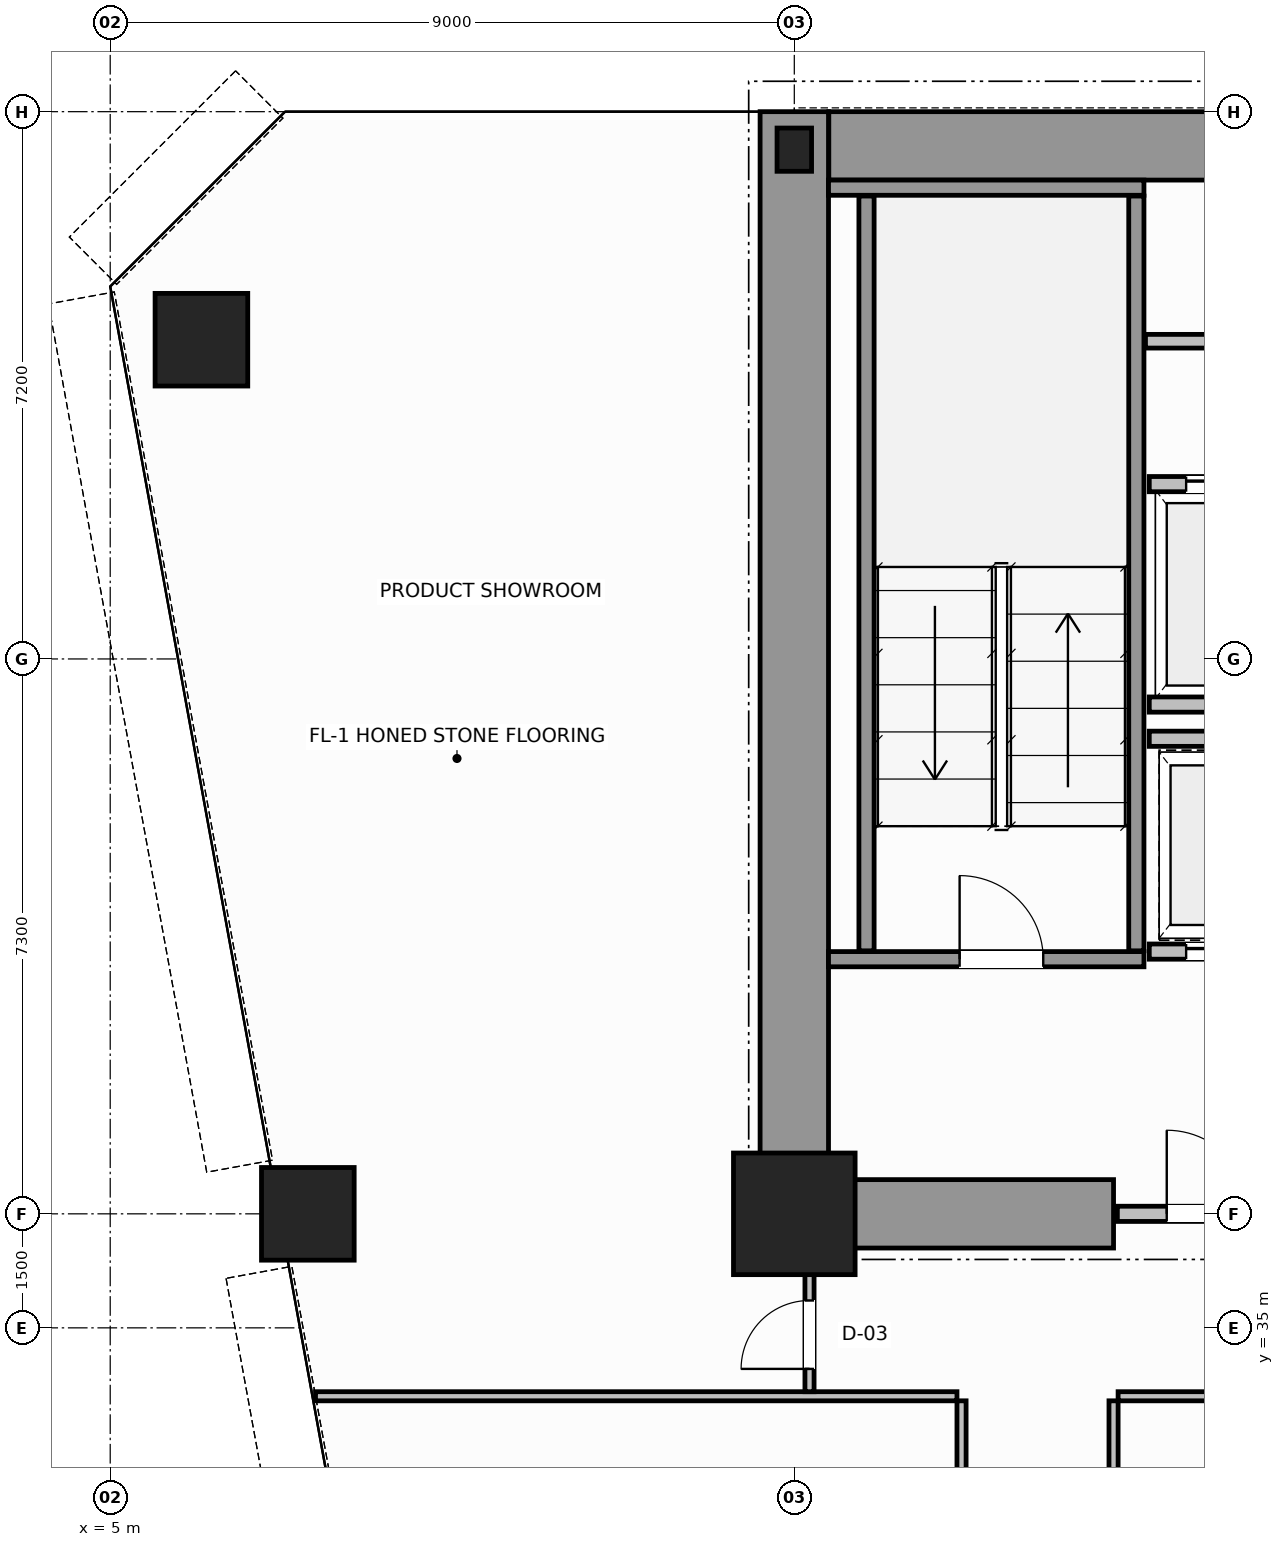
"""IFC4 building model, lengths in metres.
Left out: names, types, materials, properties, quantities, classifications, styles, units other than length and angle.
Written with IfcOpenShell. Run it as: python <this file> out.ifc"""

import sys

from ifc_helpers import new_model, si_unit, direction, frame, frame_2d, origin, origin_2d, place, context, subcontext, project, spatial, rectangle, hollow_circle, i_section, extrude, source, transform, mapped, element, fill, save


model = new_model("IFC4")
c1 = context("Model", 3, precision=1e-05, world=origin(), true_north=direction((0.0, 1.0)))
c2 = subcontext(c1, "Body", "Model", "MODEL_VIEW")
j1 = project(units=[si_unit("LENGTHUNIT", "METRE"), si_unit("PLANEANGLEUNIT", "RADIAN")], contexts=[c1])
p1 = place(None, origin())
s1 = spatial("IfcSite", under=j1, at=p1, CompositionType="ELEMENT")
p2 = place(p1, origin())
s2 = spatial("IfcBuilding", under=s1, at=p2, CompositionType="ELEMENT")
p3 = place(p2, frame((0.0, 0.0, 56.8)))
s3 = spatial("IfcBuildingStorey", under=s2, at=p3, CompositionType="ELEMENT", Elevation=56.8)
m1 = source(origin(), c2, "Body", "SweptSolid", [
    extrude(rectangle(XDim=1.6, YDim=1.6, at=origin_2d()), origin(), (0.0, 0.0, 1.0), 3.8),
])
p4 = place(p3, frame((14.0, 36.5, 0.0), z_axis=(0.0, 0.0, 1.0), x_axis=(1.0, 0.0, 0.0)))
e1 = element("IfcColumn", 1, at=p4, inside=s3, PredefinedType="COLUMN", context=c2, shape_type="MappedRepresentation", body=[
    mapped(m1, transform((0.0, 0.0, 0.0), scale=1.0)),
])
m2 = source(origin(), c2, "Body", "SweptSolid", [
    extrude(i_section(OverallWidth=0.454, OverallDepth=0.569, WebThickness=0.078, FlangeThickness=0.08, FilletRadius=0.015, at=origin_2d()), origin(), (0.0, 0.0, 1.0), 3.8),
])
p5 = place(p3, frame((14.0, 50.5, 0.0), z_axis=(0.0, 0.0, 1.0), x_axis=(1.0, 0.0, 0.0)))
e2 = element("IfcColumn", 2, at=p5, inside=s3, PredefinedType="COLUMN", context=c2, shape_type="MappedRepresentation", body=[
    mapped(m2, transform((0.0, 0.0, 0.0), scale=1.0)),
])
m3 = source(origin(), c2, "Body", "SweptSolid", [
    extrude(hollow_circle(Radius=0.61, WallThickness=0.05, at=origin_2d()), origin(), (0.0, 0.0, 1.0), 3.8),
])
for number, where, z_axis, x_axis in (
    (3, (6.2, 48.0, 0.0), (0.0, 0.0, 1.0), (1.0, 0.0, 0.0)),
    (4, (7.6, 36.5, 0.0), (0.0, 0.0, 1.0), (1.0, 0.0, 0.0)),
):
    element("IfcColumn", number, at=place(p3, frame(where, z_axis=z_axis, x_axis=x_axis)), inside=s3, PredefinedType="COLUMN", context=c2, shape_type="MappedRepresentation", body=[
        mapped(m3, transform((0.0, 0.0, 0.0), scale=1.0)),
    ])
p6 = place(p3, frame((14.454, 50.55, 0.0), z_axis=(0.0, 0.0, 1.0), x_axis=(1.0, 0.0, 0.0)))
e5 = element("IfcWall", 5, at=p6, inside=s3, PredefinedType="SHEAR", context=c2, shape_type="SweptSolid", body=[
    extrude(rectangle(XDim=19.544, YDim=0.9, at=frame_2d((9.772, 0.0))), origin(), (0.0, 0.0, 1.0), 3.8),
])
p7 = place(p3, frame((14.0, 36.5, 0.0), z_axis=(0.0, 0.0, 1.0), x_axis=(0.0, 1.0, 0.0)))
e6 = element("IfcWall", 6, at=p7, inside=s3, PredefinedType="SHEAR", context=c2, shape_type="SweptSolid", body=[
    extrude(rectangle(XDim=14.5, YDim=0.9, at=frame_2d((7.25, 0.0))), origin(), (0.0, 0.0, 1.0), 3.8),
])
p8 = place(p3, frame((14.47, 36.5, 0.0), z_axis=(0.0, 0.0, 1.0), x_axis=(1.0, 0.0, 0.0)))
e7 = element("IfcWall", 7, at=p8, inside=s3, PredefinedType="SHEAR", context=c2, shape_type="SweptSolid", body=[
    extrude(rectangle(XDim=3.73, YDim=0.9, at=frame_2d((1.865, 0.0))), origin(), (0.0, 0.0, 1.0), 2.38),
])
p9 = place(p3, frame((14.45, 39.85, 0.0), z_axis=(0.0, 0.0, 1.0), x_axis=(1.0, 0.0, 0.0)))
e8 = element("IfcWall", 8, at=p9, inside=s3, PredefinedType="SOLIDWALL", context=c2, shape_type="SweptSolid", body=[
    extrude(rectangle(XDim=4.15, YDim=0.2, at=frame_2d((2.075, 0.0))), origin(), (0.0, 0.0, 1.0), 3.8),
])
p10 = place(p9, frame((1.725, 0.0, 0.0)))
e9 = element("IfcOpeningElement", 9, at=p10, cuts=e8, PredefinedType="OPENING", context=c2, shape_type="SweptSolid", body=[
    extrude(rectangle(XDim=1.1, YDim=2.15, at=frame_2d((0.55, 1.075))), frame((0.0, 0.11, 0.0), z_axis=(0.0, -1.0, 0.0), x_axis=(1.0, 0.0, 0.0)), (0.0, 0.0, 1.0), 0.22),
])
p11 = place(p3, frame((14.45, 50.0, 0.0), z_axis=(0.0, 0.0, 1.0), x_axis=(1.0, 0.0, 0.0)))
e10 = element("IfcWall", 10, at=p11, inside=s3, PredefinedType="SOLIDWALL", context=c2, shape_type="SweptSolid", body=[
    extrude(rectangle(XDim=4.15, YDim=0.2, at=frame_2d((2.075, 0.0))), origin(), (0.0, 0.0, 1.0), 3.8),
])
for number, where, z_axis, x_axis in (
    (11, (14.95, 39.96, 0.0), (0.0, 0.0, 1.0), (0.0, 1.0, 0.0)),
    (12, (18.5, 39.96, 0.0), (0.0, 0.0, 1.0), (0.0, 1.0, 0.0)),
):
    element("IfcWall", number, at=place(p3, frame(where, z_axis=z_axis, x_axis=x_axis)), inside=s3, PredefinedType="SOLIDWALL", context=c2, shape_type="SweptSolid", body=[
        extrude(rectangle(XDim=9.93, YDim=0.2, at=frame_2d((4.965, 0.0))), origin(), (0.0, 0.0, 1.0), 3.8),
    ])
p12 = place(p3, frame((18.25, 36.5, 0.0), z_axis=(0.0, 0.0, 1.0), x_axis=(1.0, 0.0, 0.0)))
e13 = element("IfcWall", 13, at=p12, inside=s3, PredefinedType="SOLIDWALL", context=c2, shape_type="SweptSolid", body=[
    extrude(rectangle(XDim=2.47, YDim=0.2, at=frame_2d((1.235, 0.0))), origin(), (0.0, 0.0, 1.0), 2.37),
])
p13 = place(p12, frame((0.65, 0.0, 0.0)))
e14 = element("IfcOpeningElement", 14, at=p13, cuts=e13, PredefinedType="OPENING", context=c2, shape_type="SweptSolid", body=[
    extrude(rectangle(XDim=1.1, YDim=2.15, at=frame_2d((0.55, 1.075))), frame((0.0, 0.11, 0.0), z_axis=(0.0, -1.0, 0.0), x_axis=(1.0, 0.0, 0.0)), (0.0, 0.0, 1.0), 0.22),
])
p14 = place(p3, frame((18.67, 46.1, 0.0), z_axis=(0.0, 0.0, 1.0), x_axis=(1.0, 0.0, 0.0)))
e15 = element("IfcWall", 15, at=p14, inside=s3, PredefinedType="SOLIDWALL", context=c2, shape_type="SweptSolid", body=[
    extrude(rectangle(XDim=2.07, YDim=0.2, at=frame_2d((1.035, 0.0))), origin(), (0.0, 0.0, 1.0), 3.58),
])
p15 = place(p14, frame((0.485, 0.0, 0.0)))
e16 = element("IfcOpeningElement", 16, at=p15, cuts=e15, PredefinedType="OPENING", context=c2, shape_type="SweptSolid", body=[
    extrude(rectangle(XDim=1.1, YDim=2.15, at=frame_2d((0.55, 1.075))), frame((0.0, 0.11, 0.0), z_axis=(0.0, -1.0, 0.0), x_axis=(1.0, 0.0, 0.0)), (0.0, 0.0, 1.0), 0.22),
])
p16 = place(p3, frame((18.67, 43.2, 0.0), z_axis=(0.0, 0.0, 1.0), x_axis=(1.0, 0.0, 0.0)))
e17 = element("IfcWall", 17, at=p16, inside=s3, PredefinedType="SOLIDWALL", context=c2, shape_type="SweptSolid", body=[
    extrude(rectangle(XDim=2.07, YDim=0.2, at=frame_2d((1.035, 0.0))), origin(), (0.0, 0.0, 1.0), 3.58),
])
p17 = place(p3, frame((18.67, 39.95, 0.0), z_axis=(0.0, 0.0, 1.0), x_axis=(1.0, 0.0, 0.0)))
e18 = element("IfcWall", 18, at=p17, inside=s3, PredefinedType="SOLIDWALL", context=c2, shape_type="SweptSolid", body=[
    extrude(rectangle(XDim=2.07, YDim=0.2, at=frame_2d((1.035, 0.0))), origin(), (0.0, 0.0, 1.0), 3.58),
])
p18 = place(p17, frame((0.485, 0.0, 0.0)))
e19 = element("IfcOpeningElement", 19, at=p18, cuts=e18, PredefinedType="OPENING", context=c2, shape_type="SweptSolid", body=[
    extrude(rectangle(XDim=1.1, YDim=2.15, at=frame_2d((0.55, 1.075))), frame((0.0, 0.11, 0.0), z_axis=(0.0, -1.0, 0.0), x_axis=(1.0, 0.0, 0.0)), (0.0, 0.0, 1.0), 0.22),
])
p19 = place(p3, frame((18.67, 42.75, 0.0), z_axis=(0.0, 0.0, 1.0), x_axis=(1.0, 0.0, 0.0)))
e20 = element("IfcWall", 20, at=p19, inside=s3, PredefinedType="SOLIDWALL", context=c2, shape_type="SweptSolid", body=[
    extrude(rectangle(XDim=2.07, YDim=0.2, at=frame_2d((1.035, 0.0))), origin(), (0.0, 0.0, 1.0), 3.58),
])
p20 = place(p3, frame((18.62, 47.98, 0.0), z_axis=(0.0, 0.0, 1.0), x_axis=(1.0, 0.0, 0.0)))
e21 = element("IfcWall", 21, at=p20, inside=s3, PredefinedType="PLUMBINGWALL", context=c2, shape_type="SweptSolid", body=[
    extrude(rectangle(XDim=20.06, YDim=0.18, at=frame_2d((10.03, 0.0))), origin(), (0.0, 0.0, 1.0), 3.58),
])
p21 = place(p20, frame((3.5, 0.0, 0.0)))
e22 = element("IfcOpeningElement", 22, at=p21, cuts=e21, PredefinedType="OPENING", context=c2, shape_type="SweptSolid", body=[
    extrude(rectangle(XDim=0.9, YDim=2.15, at=frame_2d((0.45, 1.075))), frame((0.0, 0.1, 0.0), z_axis=(0.0, -1.0, 0.0), x_axis=(1.0, 0.0, 0.0)), (0.0, 0.0, 1.0), 0.2),
])
p22 = place(p20, frame((10.8, 0.0, 0.0)))
e23 = element("IfcOpeningElement", 23, at=p22, cuts=e21, PredefinedType="OPENING", context=c2, shape_type="SweptSolid", body=[
    extrude(rectangle(XDim=0.9, YDim=2.15, at=frame_2d((0.45, 1.075))), frame((0.0, 0.1, 0.0), z_axis=(0.0, -1.0, 0.0), x_axis=(1.0, 0.0, 0.0)), (0.0, 0.0, 1.0), 0.2),
])
p23 = place(p20, frame((16.8, 0.0, 0.0)))
e24 = element("IfcOpeningElement", 24, at=p23, cuts=e21, PredefinedType="OPENING", context=c2, shape_type="SweptSolid", body=[
    extrude(rectangle(XDim=0.9, YDim=2.15, at=frame_2d((0.45, 1.075))), frame((0.0, 0.1, 0.0), z_axis=(0.0, -1.0, 0.0), x_axis=(1.0, 0.0, 0.0)), (0.0, 0.0, 1.0), 0.2),
])
p24 = place(p3, frame((18.26, 34.1, 0.0), z_axis=(0.0, 0.0, 1.0), x_axis=(1.0, 0.0, 0.0)))
e25 = element("IfcWall", 25, at=p24, inside=s3, PredefinedType="PARTITIONING", context=c2, shape_type="SweptSolid", body=[
    extrude(rectangle(XDim=31.48, YDim=0.12, at=frame_2d((15.74, 0.0))), origin(), (0.0, 0.0, 1.0), 3.58),
])
p25 = place(p24, frame((2.59, 0.0, 0.0)))
e26 = element("IfcOpeningElement", 26, at=p25, cuts=e25, PredefinedType="OPENING", context=c2, shape_type="SweptSolid", body=[
    extrude(rectangle(XDim=0.9, YDim=2.15, at=frame_2d((0.45, 1.075))), frame((0.0, 0.07, 0.0), z_axis=(0.0, -1.0, 0.0), x_axis=(1.0, 0.0, 0.0)), (0.0, 0.0, 1.0), 0.14),
])
p26 = place(p24, frame((9.89, 0.0, 0.0)))
e27 = element("IfcOpeningElement", 27, at=p26, cuts=e25, PredefinedType="OPENING", context=c2, shape_type="SweptSolid", body=[
    extrude(rectangle(XDim=0.9, YDim=2.15, at=frame_2d((0.45, 1.075))), frame((0.0, 0.07, 0.0), z_axis=(0.0, -1.0, 0.0), x_axis=(1.0, 0.0, 0.0)), (0.0, 0.0, 1.0), 0.14),
])
p27 = place(p24, frame((18.79, 0.0, 0.0)))
e28 = element("IfcOpeningElement", 28, at=p27, cuts=e25, PredefinedType="OPENING", context=c2, shape_type="SweptSolid", body=[
    extrude(rectangle(XDim=0.9, YDim=2.15, at=frame_2d((0.45, 1.075))), frame((0.0, 0.07, 0.0), z_axis=(0.0, -1.0, 0.0), x_axis=(1.0, 0.0, 0.0)), (0.0, 0.0, 1.0), 0.14),
])
p28 = place(p24, frame((27.29, 0.0, 0.0)))
e29 = element("IfcOpeningElement", 29, at=p28, cuts=e25, PredefinedType="OPENING", context=c2, shape_type="SweptSolid", body=[
    extrude(rectangle(XDim=0.9, YDim=2.15, at=frame_2d((0.45, 1.075))), frame((0.0, 0.07, 0.0), z_axis=(0.0, -1.0, 0.0), x_axis=(1.0, 0.0, 0.0)), (0.0, 0.0, 1.0), 0.14),
])
p29 = place(p3, frame((7.701, 34.1, 0.0), z_axis=(0.0, 0.0, 1.0), x_axis=(1.0, 0.0, 0.0)))
e30 = element("IfcWall", 30, at=p29, inside=s3, PredefinedType="PARTITIONING", context=c2, shape_type="SweptSolid", body=[
    extrude(rectangle(XDim=8.439, YDim=0.12, at=frame_2d((4.22, 0.0))), origin(), (0.0, 0.0, 1.0), 3.58),
])
p30 = place(p3, frame((14.2, 34.16, 0.0), z_axis=(0.0, 0.0, 1.0), x_axis=(0.0, 1.0, 0.0)))
e31 = element("IfcWall", 31, at=p30, inside=s3, PredefinedType="PARTITIONING", context=c2, shape_type="SweptSolid", body=[
    extrude(rectangle(XDim=2.28, YDim=0.12, at=frame_2d((1.14, 0.0))), origin(), (0.0, 0.0, 1.0), 3.58),
])
p31 = place(p30, frame((0.3, 0.0, 0.0)))
e32 = element("IfcOpeningElement", 32, at=p31, cuts=e31, PredefinedType="OPENING", context=c2, shape_type="SweptSolid", body=[
    extrude(rectangle(XDim=0.9, YDim=2.15, at=frame_2d((0.45, 1.075))), frame((0.0, 0.07, 0.0), z_axis=(0.0, -1.0, 0.0), x_axis=(1.0, 0.0, 0.0)), (0.0, 0.0, 1.0), 0.14),
])
p32 = place(p3, frame((16.2, 18.2, 0.0), z_axis=(0.0, 0.0, 1.0), x_axis=(0.0, 1.0, 0.0)))
e33 = element("IfcWall", 33, at=p32, inside=s3, PredefinedType="PARTITIONING", context=c2, shape_type="SweptSolid", body=[
    extrude(rectangle(XDim=15.84, YDim=0.12, at=frame_2d((7.92, 0.0))), origin(), (0.0, 0.0, 1.0), 3.58),
])
p33 = place(p32, frame((3.25, 0.0, 0.0)))
e34 = element("IfcOpeningElement", 34, at=p33, cuts=e33, PredefinedType="OPENING", context=c2, shape_type="SweptSolid", body=[
    extrude(rectangle(XDim=0.9, YDim=2.15, at=frame_2d((0.45, 1.075))), frame((0.0, 0.07, 0.0), z_axis=(0.0, -1.0, 0.0), x_axis=(1.0, 0.0, 0.0)), (0.0, 0.0, 1.0), 0.14),
])
p34 = place(p32, frame((11.17, 0.0, 0.0)))
e35 = element("IfcOpeningElement", 35, at=p34, cuts=e33, PredefinedType="OPENING", context=c2, shape_type="SweptSolid", body=[
    extrude(rectangle(XDim=0.9, YDim=2.15, at=frame_2d((0.45, 1.075))), frame((0.0, 0.07, 0.0), z_axis=(0.0, -1.0, 0.0), x_axis=(1.0, 0.0, 0.0)), (0.0, 0.0, 1.0), 0.14),
])
p35 = place(p3, frame((18.2, 18.2, 0.0), z_axis=(0.0, 0.0, 1.0), x_axis=(0.0, 1.0, 0.0)))
e36 = element("IfcWall", 36, at=p35, inside=s3, PredefinedType="PARTITIONING", context=c2, shape_type="SweptSolid", body=[
    extrude(rectangle(XDim=15.84, YDim=0.12, at=frame_2d((7.92, 0.0))), origin(), (0.0, 0.0, 1.0), 3.58),
])
m4 = source(origin(), c2, "Body", "SweptSolid", [
    extrude(rectangle(XDim=1.1, YDim=2.15, at=frame_2d((0.55, 1.075))), frame((0.0, 0.025, 0.0), z_axis=(0.0, -1.0, 0.0), x_axis=(1.0, 0.0, 0.0)), (0.0, 0.0, 1.0), 0.05),
])
p36 = place(p10, origin())
e37 = element("IfcDoor", 37, at=p36, inside=s3, OperationType="SINGLE_SWING_LEFT", PredefinedType="DOOR", context=c2, shape_type="MappedRepresentation", body=[
    mapped(m4, transform((0.0, 0.0, 0.0), scale=1.0)),
])
fill(e9, e37)
p37 = place(p13, origin())
e38 = element("IfcDoor", 38, at=p37, inside=s3, OperationType="SINGLE_SWING_RIGHT", PredefinedType="DOOR", context=c2, shape_type="MappedRepresentation", body=[
    mapped(m4, transform((0.0, 0.0, 0.0), scale=1.0)),
])
fill(e14, e38)
p38 = place(p15, origin())
e39 = element("IfcDoor", 39, at=p38, inside=s3, OperationType="DOUBLE_DOOR_SLIDING", PredefinedType="DOOR", context=c2, shape_type="MappedRepresentation", body=[
    mapped(m4, transform((0.0, 0.0, 0.0), scale=1.0)),
])
fill(e16, e39)
p39 = place(p18, origin())
e40 = element("IfcDoor", 40, at=p39, inside=s3, OperationType="DOUBLE_DOOR_SLIDING", PredefinedType="DOOR", context=c2, shape_type="MappedRepresentation", body=[
    mapped(m4, transform((0.0, 0.0, 0.0), scale=1.0)),
])
fill(e19, e40)
m5 = source(origin(), c2, "Body", "SweptSolid", [
    extrude(rectangle(XDim=0.9, YDim=2.15, at=frame_2d((0.45, 1.075))), frame((0.0, 0.025, 0.0), z_axis=(0.0, -1.0, 0.0), x_axis=(1.0, 0.0, 0.0)), (0.0, 0.0, 1.0), 0.05),
])
p40 = place(p31, origin())
e41 = element("IfcDoor", 41, at=p40, inside=s3, OperationType="SINGLE_SWING_LEFT", PredefinedType="DOOR", context=c2, shape_type="MappedRepresentation", body=[
    mapped(m5, transform((0.0, 0.0, 0.0), scale=1.0)),
])
fill(e32, e41)
save(model, sys.argv[1])
